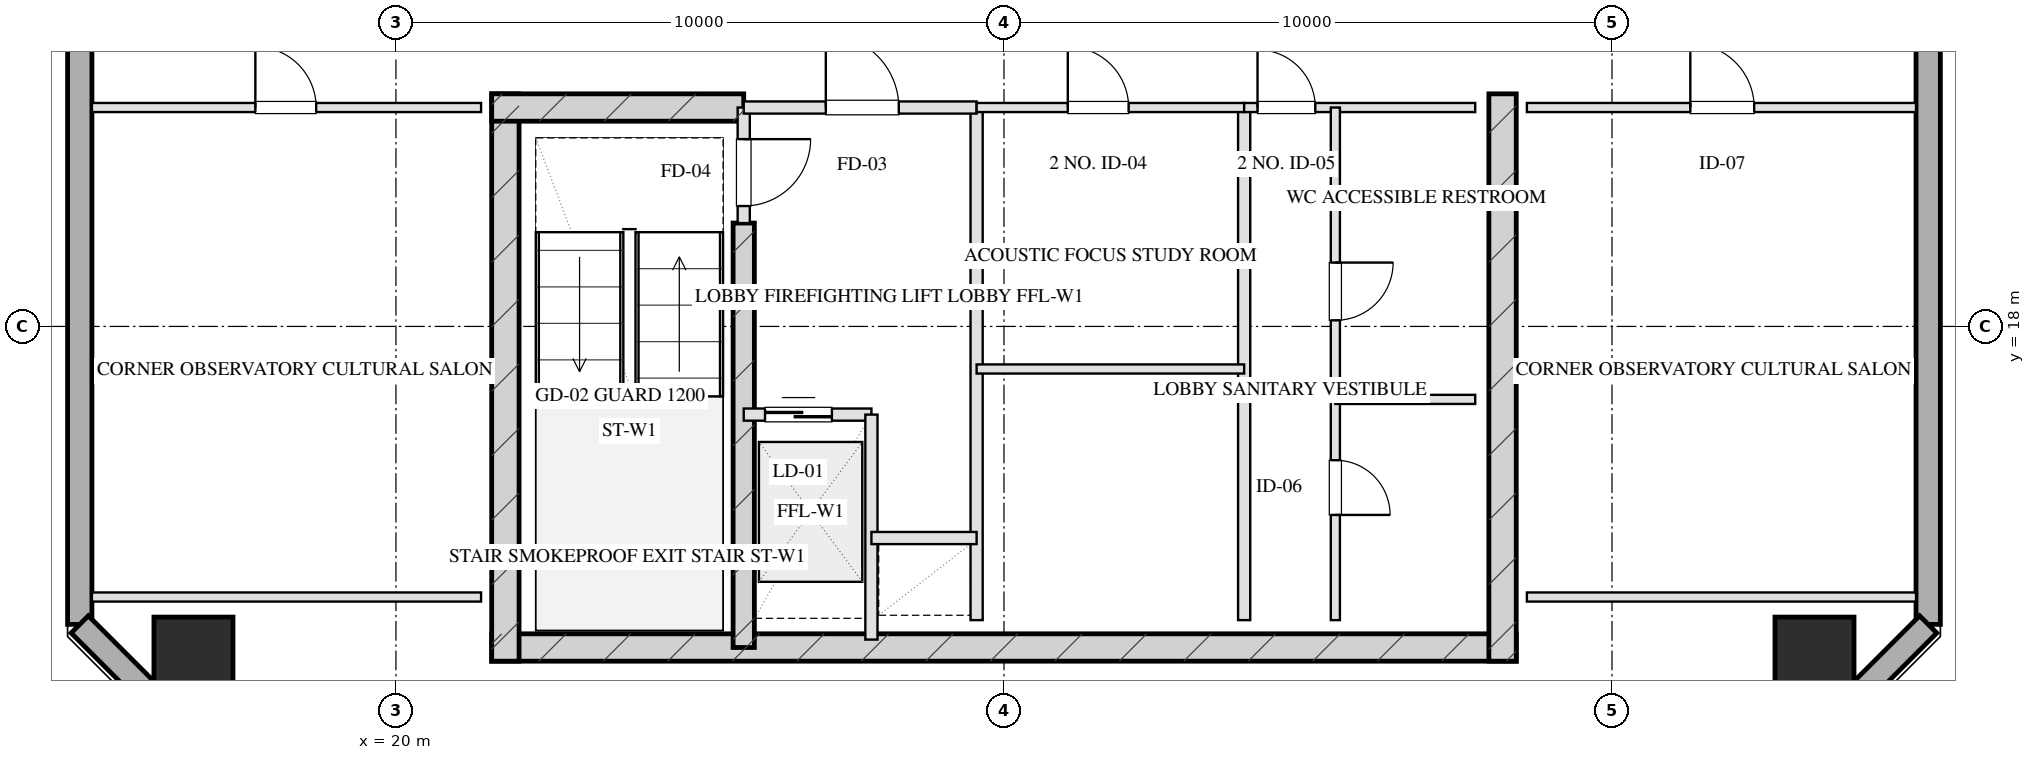
"""IFC4 building model, lengths in metres.
Left out: names, types, materials, properties, quantities, classifications, styles, units other than length and angle.
Written with IfcOpenShell. Run it as: python <this file> out.ifc"""

import sys

from ifc_helpers import new_model, si_unit, direction, frame, frame_2d, origin, origin_2d, place, context, subcontext, project, spatial, rectangle, hollow_rectangle, extrude, element, fill, save


model = new_model("IFC4")
c1 = context("Model", 3, precision=1e-05, world=origin(), true_north=direction((0.0, 1.0)))
c2 = subcontext(c1, "Body", "Model", "MODEL_VIEW")
j1 = project(units=[si_unit("LENGTHUNIT", "METRE"), si_unit("PLANEANGLEUNIT", "RADIAN")], contexts=[c1])
p1 = place(None, origin())
s1 = spatial("IfcSite", under=j1, at=p1, CompositionType="ELEMENT")
p2 = place(p1, origin())
s2 = spatial("IfcBuilding", under=s1, at=p2, CompositionType="ELEMENT")
p3 = place(p2, frame((0.0, 0.0, 269.6)))
s3 = spatial("IfcBuildingStorey", under=s2, at=p3, CompositionType="ELEMENT", Elevation=269.6)
p4 = place(p3, frame((21.575, 12.72, 0.0), z_axis=(0.0, 0.0, 1.0), x_axis=(1.0, 0.0, 0.0)))
e1 = element("IfcWall", 1, at=p4, inside=s3, PredefinedType="SHEAR", context=c2, shape_type="SweptSolid", body=[
    extrude(rectangle(XDim=16.85, YDim=0.45, at=frame_2d((8.425, 0.0))), origin(), (0.0, 0.0, 1.0), 3.2),
])
for number, where, z_axis, x_axis in (
    (2, (21.8, 21.825, 0.0), (0.0, 0.0, 1.0), (0.0, -1.0, 0.0)),
    (3, (38.2, 21.825, 0.0), (0.0, 0.0, 1.0), (0.0, -1.0, 0.0)),
):
    element("IfcWall", number, at=place(p3, frame(where, z_axis=z_axis, x_axis=x_axis)), inside=s3, PredefinedType="SHEAR", context=c2, shape_type="SweptSolid", body=[
        extrude(rectangle(XDim=9.33, YDim=0.45, at=frame_2d((4.665, 0.0))), origin(), (0.0, 0.0, 1.0), 3.2),
    ])
p5 = place(p3, frame((25.72, 19.7, 0.0), z_axis=(0.0, 0.0, 1.0), x_axis=(0.0, -1.0, 0.0)))
e4 = element("IfcWall", 4, at=p5, inside=s3, PredefinedType="SHEAR", context=c2, shape_type="SweptSolid", body=[
    extrude(rectangle(XDim=6.98, YDim=0.35, at=frame_2d((3.49, 0.0))), origin(), (0.0, 0.0, 1.0), 3.2),
])
p6 = place(p3, frame((21.575, 21.6, 0.0), z_axis=(0.0, 0.0, 1.0), x_axis=(1.0, 0.0, 0.0)))
e5 = element("IfcWall", 5, at=p6, inside=s3, PredefinedType="SHEAR", context=c2, shape_type="SweptSolid", body=[
    extrude(rectangle(XDim=4.145, YDim=0.45, at=frame_2d((2.073, 0.0))), origin(), (0.0, 0.0, 1.0), 3.2),
])
for number, where, z_axis, x_axis in (
    (6, (16.67, 12.57, 0.0), (0.0, 0.0, 1.0), (1.0, 0.0, 0.0)),
    (7, (43.33, 12.57, 0.0), (0.0, 0.0, 1.0), (1.0, 0.0, 0.0)),
):
    element("IfcColumn", number, at=place(p3, frame(where, z_axis=z_axis, x_axis=x_axis)), inside=s3, PredefinedType="COLUMN", context=c2, shape_type="SweptSolid", body=[
        extrude(hollow_rectangle(XDim=1.3, YDim=1.3, WallThickness=0.045, at=origin_2d()), origin(), (0.0, 0.0, 1.0), 3.201),
    ])
p7 = place(p3, frame((14.8, 13.1, 0.0), z_axis=(0.0, 0.0, 1.0), x_axis=(0.0, 1.0, 0.0)))
e8 = element("IfcWall", 8, at=p7, inside=s3, PredefinedType="SOLIDWALL", context=c2, shape_type="SweptSolid", body=[
    extrude(rectangle(XDim=41.8, YDim=0.4, at=frame_2d((20.9, 0.0))), origin(), (0.0, 0.0, 1.0), 2.36),
])
p8 = place(p7, frame((22.525, 0.0, 0.75)))
e9 = element("IfcOpeningElement", 9, at=p8, cuts=e8, PredefinedType="OPENING", context=c2, shape_type="SweptSolid", body=[
    extrude(rectangle(XDim=1.95, YDim=1.21, at=frame_2d((0.975, 0.605))), frame((0.0, 0.21, 0.0), z_axis=(0.0, -1.0, 0.0), x_axis=(1.0, 0.0, 0.0)), (0.0, 0.0, 1.0), 0.42),
])
p9 = place(p7, frame((26.325, 0.0, 0.75)))
e10 = element("IfcOpeningElement", 10, at=p9, cuts=e8, PredefinedType="OPENING", context=c2, shape_type="SweptSolid", body=[
    extrude(rectangle(XDim=1.95, YDim=1.21, at=frame_2d((0.975, 0.605))), frame((0.0, 0.21, 0.0), z_axis=(0.0, -1.0, 0.0), x_axis=(1.0, 0.0, 0.0)), (0.0, 0.0, 1.0), 0.42),
])
p10 = place(p7, frame((14.55, 0.0, 0.0)))
e11 = element("IfcOpeningElement", 11, at=p10, cuts=e8, PredefinedType="OPENING", context=c2, shape_type="SweptSolid", body=[
    extrude(rectangle(XDim=1.1, YDim=2.15, at=frame_2d((0.55, 1.075))), frame((0.0, 0.21, 0.0), z_axis=(0.0, -1.0, 0.0), x_axis=(1.0, 0.0, 0.0)), (0.0, 0.0, 1.0), 0.42),
])
p11 = place(p3, frame((45.2, 54.9, 0.0), z_axis=(0.0, 0.0, 1.0), x_axis=(0.0, -1.0, 0.0)))
e12 = element("IfcWall", 12, at=p11, inside=s3, PredefinedType="SOLIDWALL", context=c2, shape_type="SweptSolid", body=[
    extrude(rectangle(XDim=41.8, YDim=0.4, at=frame_2d((20.9, 0.0))), origin(), (0.0, 0.0, 1.0), 2.36),
])
p12 = place(p11, frame((17.325, 0.0, 0.75)))
e13 = element("IfcOpeningElement", 13, at=p12, cuts=e12, PredefinedType="OPENING", context=c2, shape_type="SweptSolid", body=[
    extrude(rectangle(XDim=1.95, YDim=1.21, at=frame_2d((0.975, 0.605))), frame((0.0, 0.21, 0.0), z_axis=(0.0, -1.0, 0.0), x_axis=(1.0, 0.0, 0.0)), (0.0, 0.0, 1.0), 0.42),
])
p13 = place(p11, frame((13.525, 0.0, 0.75)))
e14 = element("IfcOpeningElement", 14, at=p13, cuts=e12, PredefinedType="OPENING", context=c2, shape_type="SweptSolid", body=[
    extrude(rectangle(XDim=1.95, YDim=1.21, at=frame_2d((0.975, 0.605))), frame((0.0, 0.21, 0.0), z_axis=(0.0, -1.0, 0.0), x_axis=(1.0, 0.0, 0.0)), (0.0, 0.0, 1.0), 0.42),
])
p14 = place(p11, frame((23.45, 0.0, 0.0)))
e15 = element("IfcOpeningElement", 15, at=p14, cuts=e12, PredefinedType="OPENING", context=c2, shape_type="SweptSolid", body=[
    extrude(rectangle(XDim=1.1, YDim=2.15, at=frame_2d((0.55, 1.075))), frame((0.0, 0.21, 0.0), z_axis=(0.0, -1.0, 0.0), x_axis=(1.0, 0.0, 0.0)), (0.0, 0.0, 1.0), 0.42),
])
for number, where, z_axis, x_axis in (
    (16, (45.2, 13.1, 0.0), (0.0, 0.0, 1.0), (-0.707, -0.707, 0.0)),
    (17, (17.2, 10.7, 0.0), (0.0, 0.0, 1.0), (-0.707, 0.707, 0.0)),
):
    element("IfcWall", number, at=place(p3, frame(where, z_axis=z_axis, x_axis=x_axis)), inside=s3, PredefinedType="SOLIDWALL", context=c2, shape_type="SweptSolid", body=[
        extrude(rectangle(XDim=3.394, YDim=0.4, at=frame_2d((1.697, 0.0))), origin(), (0.0, 0.0, 1.0), 2.36),
    ])
p15 = place(p3, frame((25.72, 21.6, 0.0), z_axis=(0.0, 0.0, 1.0), x_axis=(0.0, -1.0, 0.0)))
e18 = element("IfcWall", 18, at=p15, inside=s3, PredefinedType="PARTITIONING", context=c2, shape_type="SweptSolid", body=[
    extrude(rectangle(XDim=1.9, YDim=0.2, at=frame_2d((0.95, 0.0))), origin(), (0.0, 0.0, 1.0), 2.925),
])
p16 = place(p15, frame((0.52, 0.0, 0.0)))
e19 = element("IfcOpeningElement", 19, at=p16, cuts=e18, PredefinedType="OPENING", context=c2, shape_type="SweptSolid", body=[
    extrude(rectangle(XDim=1.1, YDim=2.05, at=frame_2d((0.55, 1.025))), frame((0.0, 0.11, 0.0), z_axis=(0.0, -1.0, 0.0), x_axis=(1.0, 0.0, 0.0)), (0.0, 0.0, 1.0), 0.22),
])
p17 = place(p3, frame((29.55, 21.6, 0.0), z_axis=(0.0, 0.0, 1.0), x_axis=(0.0, -1.0, 0.0)))
e20 = element("IfcWall", 20, at=p17, inside=s3, PredefinedType="PARTITIONING", context=c2, shape_type="SweptSolid", body=[
    extrude(rectangle(XDim=8.43, YDim=0.2, at=frame_2d((4.215, 0.0))), origin(), (0.0, 0.0, 1.0), 2.925),
])
p18 = place(p3, frame((25.72, 21.6, 0.0), z_axis=(0.0, 0.0, 1.0), x_axis=(1.0, 0.0, 0.0)))
e21 = element("IfcWall", 21, at=p18, inside=s3, PredefinedType="PARTITIONING", context=c2, shape_type="SweptSolid", body=[
    extrude(rectangle(XDim=3.83, YDim=0.2, at=frame_2d((1.915, 0.0))), origin(), (0.0, 0.0, 1.0), 2.925),
])
p19 = place(p18, frame((1.35, 0.0, 0.0)))
e22 = element("IfcOpeningElement", 22, at=p19, cuts=e21, PredefinedType="OPENING", context=c2, shape_type="SweptSolid", body=[
    extrude(rectangle(XDim=1.2, YDim=2.05, at=frame_2d((0.6, 1.025))), frame((0.0, 0.11, 0.0), z_axis=(0.0, -1.0, 0.0), x_axis=(1.0, 0.0, 0.0)), (0.0, 0.0, 1.0), 0.22),
])
p20 = place(p3, frame((25.72, 16.55, 0.0), z_axis=(0.0, 0.0, 1.0), x_axis=(1.0, 0.0, 0.0)))
e23 = element("IfcWall", 23, at=p20, inside=s3, PredefinedType="PARTITIONING", context=c2, shape_type="SweptSolid", body=[
    extrude(rectangle(XDim=2.1, YDim=0.2, at=frame_2d((1.05, 0.0))), origin(), (0.0, 0.0, 1.0), 2.925),
])
p21 = place(p20, frame((0.35, 0.0, 0.0)))
e24 = element("IfcOpeningElement", 24, at=p21, cuts=e23, PredefinedType="OPENING", context=c2, shape_type="SweptSolid", body=[
    extrude(rectangle(XDim=1.1, YDim=2.05, at=frame_2d((0.55, 1.025))), frame((0.0, 0.11, 0.0), z_axis=(0.0, -1.0, 0.0), x_axis=(1.0, 0.0, 0.0)), (0.0, 0.0, 1.0), 0.22),
])
p22 = place(p3, frame((27.82, 16.55, 0.0), z_axis=(0.0, 0.0, 1.0), x_axis=(0.0, -1.0, 0.0)))
e25 = element("IfcWall", 25, at=p22, inside=s3, PredefinedType="PARTITIONING", context=c2, shape_type="SweptSolid", body=[
    extrude(rectangle(XDim=3.7, YDim=0.2, at=frame_2d((1.85, 0.0))), origin(), (0.0, 0.0, 1.0), 2.925),
])
p23 = place(p3, frame((27.82, 14.52, 0.0), z_axis=(0.0, 0.0, 1.0), x_axis=(1.0, 0.0, 0.0)))
e26 = element("IfcWall", 26, at=p23, inside=s3, PredefinedType="PARTITIONING", context=c2, shape_type="SweptSolid", body=[
    extrude(rectangle(XDim=1.73, YDim=0.2, at=frame_2d((0.865, 0.0))), origin(), (0.0, 0.0, 1.0), 2.925),
])
p24 = place(p3, frame((33.95, 21.6, 0.0), z_axis=(0.0, 0.0, 1.0), x_axis=(0.0, -1.0, 0.0)))
e27 = element("IfcWall", 27, at=p24, inside=s3, PredefinedType="PARTITIONING", context=c2, shape_type="SweptSolid", body=[
    extrude(rectangle(XDim=8.43, YDim=0.2, at=frame_2d((4.215, 0.0))), origin(), (0.0, 0.0, 1.0), 2.925),
])
p25 = place(p3, frame((29.55, 21.6, 0.0), z_axis=(0.0, 0.0, 1.0), x_axis=(1.0, 0.0, 0.0)))
e28 = element("IfcWall", 28, at=p25, inside=s3, PredefinedType="PARTITIONING", context=c2, shape_type="SweptSolid", body=[
    extrude(rectangle(XDim=4.4, YDim=0.15, at=frame_2d((2.2, 0.0))), origin(), (0.0, 0.0, 1.0), 2.925),
])
p26 = place(p25, frame((1.5, 0.0, 0.0)))
e29 = element("IfcOpeningElement", 29, at=p26, cuts=e28, PredefinedType="OPENING", context=c2, shape_type="SweptSolid", body=[
    extrude(rectangle(XDim=1.0, YDim=2.05, at=frame_2d((0.5, 1.025))), frame((0.0, 0.085, 0.0), z_axis=(0.0, -1.0, 0.0), x_axis=(1.0, 0.0, 0.0)), (0.0, 0.0, 1.0), 0.17),
])
p27 = place(p3, frame((29.55, 17.3, 0.0), z_axis=(0.0, 0.0, 1.0), x_axis=(1.0, 0.0, 0.0)))
e30 = element("IfcWall", 30, at=p27, inside=s3, PredefinedType="PARTITIONING", context=c2, shape_type="SweptSolid", body=[
    extrude(rectangle(XDim=4.4, YDim=0.15, at=frame_2d((2.2, 0.0))), origin(), (0.0, 0.0, 1.0), 2.925),
])
p28 = place(p3, frame((33.95, 21.6, 0.0), z_axis=(0.0, 0.0, 1.0), x_axis=(1.0, 0.0, 0.0)))
e31 = element("IfcWall", 31, at=p28, inside=s3, PredefinedType="PARTITIONING", context=c2, shape_type="SweptSolid", body=[
    extrude(rectangle(XDim=3.8, YDim=0.15, at=frame_2d((1.9, 0.0))), origin(), (0.0, 0.0, 1.0), 2.925),
])
p29 = place(p28, frame((0.22, 0.0, 0.0)))
e32 = element("IfcOpeningElement", 32, at=p29, cuts=e31, PredefinedType="OPENING", context=c2, shape_type="SweptSolid", body=[
    extrude(rectangle(XDim=0.95, YDim=2.05, at=frame_2d((0.475, 1.025))), frame((0.0, 0.085, 0.0), z_axis=(0.0, -1.0, 0.0), x_axis=(1.0, 0.0, 0.0)), (0.0, 0.0, 1.0), 0.17),
])
p30 = place(p3, frame((35.45, 21.6, 0.0), z_axis=(0.0, 0.0, 1.0), x_axis=(0.0, -1.0, 0.0)))
e33 = element("IfcWall", 33, at=p30, inside=s3, PredefinedType="PARTITIONING", context=c2, shape_type="SweptSolid", body=[
    extrude(rectangle(XDim=8.43, YDim=0.15, at=frame_2d((4.215, 0.0))), origin(), (0.0, 0.0, 1.0), 2.515),
])
p31 = place(p30, frame((2.55, 0.0, 0.0)))
e34 = element("IfcOpeningElement", 34, at=p31, cuts=e33, PredefinedType="OPENING", context=c2, shape_type="SweptSolid", body=[
    extrude(rectangle(XDim=0.95, YDim=2.05, at=frame_2d((0.475, 1.025))), frame((0.0, 0.085, 0.0), z_axis=(0.0, -1.0, 0.0), x_axis=(1.0, 0.0, 0.0)), (0.0, 0.0, 1.0), 0.17),
])
p32 = place(p30, frame((5.8, 0.0, 0.0)))
e35 = element("IfcOpeningElement", 35, at=p32, cuts=e33, PredefinedType="OPENING", context=c2, shape_type="SweptSolid", body=[
    extrude(rectangle(XDim=0.9, YDim=2.05, at=frame_2d((0.45, 1.025))), frame((0.0, 0.085, 0.0), z_axis=(0.0, -1.0, 0.0), x_axis=(1.0, 0.0, 0.0)), (0.0, 0.0, 1.0), 0.17),
])
p33 = place(p3, frame((35.45, 16.8, 0.0), z_axis=(0.0, 0.0, 1.0), x_axis=(1.0, 0.0, 0.0)))
e36 = element("IfcWall", 36, at=p33, inside=s3, PredefinedType="PARTITIONING", context=c2, shape_type="SweptSolid", body=[
    extrude(rectangle(XDim=2.3, YDim=0.15, at=frame_2d((1.15, 0.0))), origin(), (0.0, 0.0, 1.0), 2.925),
])
p34 = place(p3, frame((15.0, 13.55, 0.0), z_axis=(0.0, 0.0, 1.0), x_axis=(1.0, 0.0, 0.0)))
e37 = element("IfcWall", 37, at=p34, inside=s3, PredefinedType="PARTITIONING", context=c2, shape_type="SweptSolid", body=[
    extrude(rectangle(XDim=6.4, YDim=0.15, at=frame_2d((3.2, 0.0))), origin(), (0.0, 0.0, 1.0), 2.925),
])
p35 = place(p3, frame((15.0, 21.6, 0.0), z_axis=(0.0, 0.0, 1.0), x_axis=(1.0, 0.0, 0.0)))
e38 = element("IfcWall", 38, at=p35, inside=s3, PredefinedType="PARTITIONING", context=c2, shape_type="SweptSolid", body=[
    extrude(rectangle(XDim=6.4, YDim=0.15, at=frame_2d((3.2, 0.0))), origin(), (0.0, 0.0, 1.0), 2.925),
])
p36 = place(p35, frame((2.688, 0.0, 0.0)))
e39 = element("IfcOpeningElement", 39, at=p36, cuts=e38, PredefinedType="OPENING", context=c2, shape_type="SweptSolid", body=[
    extrude(rectangle(XDim=1.0, YDim=2.05, at=frame_2d((0.5, 1.025))), frame((0.0, 0.085, 0.0), z_axis=(0.0, -1.0, 0.0), x_axis=(1.0, 0.0, 0.0)), (0.0, 0.0, 1.0), 0.17),
])
p37 = place(p3, frame((38.6, 13.55, 0.0), z_axis=(0.0, 0.0, 1.0), x_axis=(1.0, 0.0, 0.0)))
e40 = element("IfcWall", 40, at=p37, inside=s3, PredefinedType="PARTITIONING", context=c2, shape_type="SweptSolid", body=[
    extrude(rectangle(XDim=6.4, YDim=0.15, at=frame_2d((3.2, 0.0))), origin(), (0.0, 0.0, 1.0), 2.925),
])
p38 = place(p3, frame((38.6, 21.6, 0.0), z_axis=(0.0, 0.0, 1.0), x_axis=(1.0, 0.0, 0.0)))
e41 = element("IfcWall", 41, at=p38, inside=s3, PredefinedType="PARTITIONING", context=c2, shape_type="SweptSolid", body=[
    extrude(rectangle(XDim=6.4, YDim=0.15, at=frame_2d((3.2, 0.0))), origin(), (0.0, 0.0, 1.0), 2.925),
])
p39 = place(p38, frame((2.688, 0.0, 0.0)))
e42 = element("IfcOpeningElement", 42, at=p39, cuts=e41, PredefinedType="OPENING", context=c2, shape_type="SweptSolid", body=[
    extrude(rectangle(XDim=1.05, YDim=2.05, at=frame_2d((0.525, 1.025))), frame((0.0, 0.085, 0.0), z_axis=(0.0, -1.0, 0.0), x_axis=(1.0, 0.0, 0.0)), (0.0, 0.0, 1.0), 0.17),
])
p40 = place(p16, origin())
e43 = element("IfcDoor", 43, at=p40, inside=s3, OperationType="SINGLE_SWING_LEFT", PredefinedType="DOOR", context=c2, shape_type="SweptSolid", body=[
    extrude(rectangle(XDim=1.1, YDim=2.05, at=frame_2d((0.55, 1.025))), frame((0.0, 0.025, 0.0), z_axis=(0.0, -1.0, 0.0), x_axis=(1.0, 0.0, 0.0)), (0.0, 0.0, 1.0), 0.05),
])
fill(e19, e43)
p41 = place(p19, origin())
e44 = element("IfcDoor", 44, at=p41, inside=s3, OperationType="SINGLE_SWING_LEFT", PredefinedType="DOOR", context=c2, shape_type="SweptSolid", body=[
    extrude(rectangle(XDim=1.2, YDim=2.05, at=frame_2d((0.6, 1.025))), frame((0.0, 0.025, 0.0), z_axis=(0.0, -1.0, 0.0), x_axis=(1.0, 0.0, 0.0)), (0.0, 0.0, 1.0), 0.05),
])
fill(e22, e44)
p42 = place(p21, origin())
e45 = element("IfcDoor", 45, at=p42, inside=s3, OperationType="DOUBLE_DOOR_SLIDING", PredefinedType="DOOR", context=c2, shape_type="SweptSolid", body=[
    extrude(rectangle(XDim=1.1, YDim=2.05, at=frame_2d((0.55, 1.025))), frame((0.0, 0.025, 0.0), z_axis=(0.0, -1.0, 0.0), x_axis=(1.0, 0.0, 0.0)), (0.0, 0.0, 1.0), 0.05),
])
fill(e24, e45)
p43 = place(p26, origin())
e46 = element("IfcDoor", 46, at=p43, inside=s3, OperationType="SINGLE_SWING_LEFT", PredefinedType="DOOR", context=c2, shape_type="SweptSolid", body=[
    extrude(rectangle(XDim=1.0, YDim=2.05, at=frame_2d((0.5, 1.025))), frame((0.0, 0.025, 0.0), z_axis=(0.0, -1.0, 0.0), x_axis=(1.0, 0.0, 0.0)), (0.0, 0.0, 1.0), 0.05),
])
fill(e29, e46)
p44 = place(p29, origin())
e47 = element("IfcDoor", 47, at=p44, inside=s3, OperationType="SINGLE_SWING_LEFT", PredefinedType="DOOR", context=c2, shape_type="SweptSolid", body=[
    extrude(rectangle(XDim=0.95, YDim=2.05, at=frame_2d((0.475, 1.025))), frame((0.0, 0.025, 0.0), z_axis=(0.0, -1.0, 0.0), x_axis=(1.0, 0.0, 0.0)), (0.0, 0.0, 1.0), 0.05),
])
fill(e32, e47)
p45 = place(p31, origin())
e48 = element("IfcDoor", 48, at=p45, inside=s3, OperationType="SINGLE_SWING_LEFT", PredefinedType="DOOR", context=c2, shape_type="SweptSolid", body=[
    extrude(rectangle(XDim=0.95, YDim=2.05, at=frame_2d((0.475, 1.025))), frame((0.0, 0.025, 0.0), z_axis=(0.0, -1.0, 0.0), x_axis=(1.0, 0.0, 0.0)), (0.0, 0.0, 1.0), 0.05),
])
fill(e34, e48)
p46 = place(p32, origin())
e49 = element("IfcDoor", 49, at=p46, inside=s3, OperationType="SINGLE_SWING_RIGHT", PredefinedType="DOOR", context=c2, shape_type="SweptSolid", body=[
    extrude(rectangle(XDim=0.9, YDim=2.05, at=frame_2d((0.45, 1.025))), frame((0.0, 0.025, 0.0), z_axis=(0.0, -1.0, 0.0), x_axis=(1.0, 0.0, 0.0)), (0.0, 0.0, 1.0), 0.05),
])
fill(e35, e49)
p47 = place(p36, origin())
e50 = element("IfcDoor", 50, at=p47, inside=s3, OperationType="SINGLE_SWING_LEFT", PredefinedType="DOOR", context=c2, shape_type="SweptSolid", body=[
    extrude(rectangle(XDim=1.0, YDim=2.05, at=frame_2d((0.5, 1.025))), frame((0.0, 0.025, 0.0), z_axis=(0.0, -1.0, 0.0), x_axis=(1.0, 0.0, 0.0)), (0.0, 0.0, 1.0), 0.05),
])
fill(e39, e50)
p48 = place(p39, origin())
e51 = element("IfcDoor", 51, at=p48, inside=s3, OperationType="SINGLE_SWING_LEFT", PredefinedType="DOOR", context=c2, shape_type="SweptSolid", body=[
    extrude(rectangle(XDim=1.05, YDim=2.05, at=frame_2d((0.525, 1.025))), frame((0.0, 0.025, 0.0), z_axis=(0.0, -1.0, 0.0), x_axis=(1.0, 0.0, 0.0)), (0.0, 0.0, 1.0), 0.05),
])
fill(e42, e51)
save(model, sys.argv[1])
